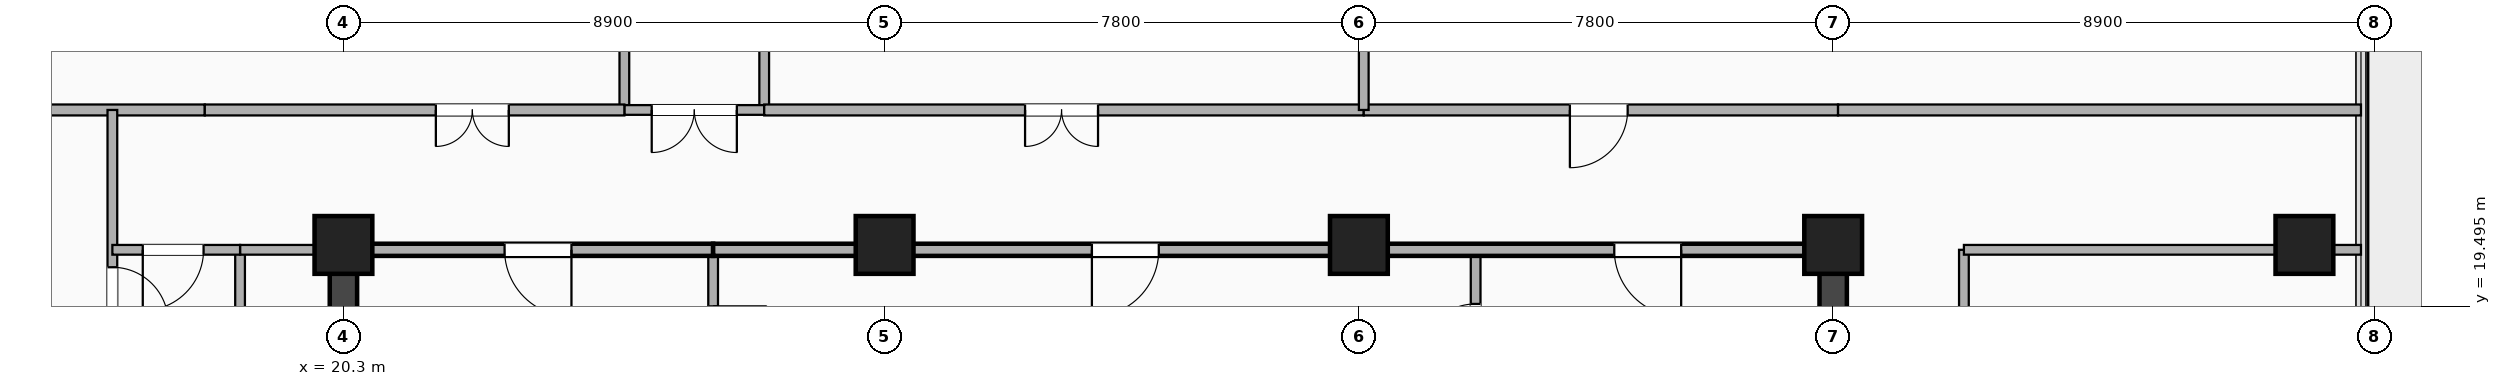
"""IFC4 building model, lengths in metres.
Left out: names, types, materials, properties, quantities, classifications, styles, units other than length and angle.
Written with IfcOpenShell. Run it as: python <this file> out.ifc"""

import sys

from ifc_helpers import new_model, si_unit, direction, frame, frame_2d, origin, origin_2d, place, context, subcontext, project, spatial, rectangle, extrude, element, fill, save


model = new_model("IFC4")
c1 = context("Model", 3, precision=1e-05, world=origin(), true_north=direction((0.0, 1.0)))
c2 = subcontext(c1, "Body", "Model", "MODEL_VIEW")
j1 = project(units=[si_unit("LENGTHUNIT", "METRE"), si_unit("PLANEANGLEUNIT", "RADIAN")], contexts=[c1])
p1 = place(None, origin())
s1 = spatial("IfcSite", under=j1, at=p1, CompositionType="ELEMENT")
p2 = place(p1, origin())
s2 = spatial("IfcBuilding", under=s1, at=p2, CompositionType="ELEMENT")
p3 = place(p2, frame((0.0, 0.0, 192.5)))
s3 = spatial("IfcBuildingStorey", under=s2, at=p3, CompositionType="ELEMENT", Elevation=192.5)
for number, where, z_axis, x_axis in (
    (1, (20.3, 3.5, 0.0), (0.0, 0.0, 1.0), (0.0, 1.0, 0.0)),
    (2, (44.8, 3.5, 0.0), (0.0, 0.0, 1.0), (0.0, 1.0, 0.0)),
):
    element("IfcWall", number, at=place(p3, frame(where, z_axis=z_axis, x_axis=x_axis)), inside=s3, PredefinedType="SHEAR", context=c2, shape_type="SweptSolid", body=[
        extrude(rectangle(XDim=16.9, YDim=0.45, at=frame_2d((8.45, 0.0))), origin(), (0.0, 0.0, 1.0), 4.16),
    ])
for number, where, z_axis, x_axis in (
    (3, (20.3, 20.5, -0.24), (0.0, 0.0, 1.0), (1.0, 0.0, 0.0)),
    (4, (29.2, 20.5, -0.24), (0.0, 0.0, 1.0), (1.0, 0.0, 0.0)),
    (5, (37.0, 20.5, -0.24), (0.0, 0.0, 1.0), (1.0, 0.0, 0.0)),
    (6, (44.8, 20.5, -0.24), (0.0, 0.0, 1.0), (1.0, 0.0, 0.0)),
    (7, (52.55, 20.5, -0.24), (0.0, 0.0, 1.0), (1.0, 0.0, 0.0)),
):
    element("IfcColumn", number, at=place(p3, frame(where, z_axis=z_axis, x_axis=x_axis)), inside=s3, PredefinedType="COLUMN", context=c2, shape_type="SweptSolid", body=[
        extrude(rectangle(XDim=0.95, YDim=0.95, at=origin_2d()), origin(), (0.0, 0.0, 1.0), 4.4),
    ])
p4 = place(p3, frame((26.38, 17.76, 0.0), z_axis=(0.0, 0.0, 1.0), x_axis=(0.0, 1.0, 0.0)))
e8 = element("IfcWall", 8, at=p4, inside=s3, PredefinedType="PARTITIONING", context=c2, shape_type="SweptSolid", body=[
    extrude(rectangle(XDim=2.66, YDim=0.16, at=frame_2d((1.33, 0.0))), origin(), (0.0, 0.0, 1.0), 3.606),
])
p5 = place(p4, frame((0.85, 0.0, 0.0)))
e9 = element("IfcOpeningElement", 9, at=p5, cuts=e8, PredefinedType="OPENING", context=c2, shape_type="SweptSolid", body=[
    extrude(rectangle(XDim=0.88, YDim=2.08, at=frame_2d((0.44, 1.04))), frame((0.0, 0.09, 0.0), z_axis=(0.0, -1.0, 0.0), x_axis=(1.0, 0.0, 0.0)), (0.0, 0.0, 1.0), 0.18),
])
p6 = place(p3, frame((38.92, 17.76, 0.0), z_axis=(0.0, 0.0, 1.0), x_axis=(0.0, 1.0, 0.0)))
e10 = element("IfcWall", 10, at=p6, inside=s3, PredefinedType="PARTITIONING", context=c2, shape_type="SweptSolid", body=[
    extrude(rectangle(XDim=2.66, YDim=0.16, at=frame_2d((1.33, 0.0))), origin(), (0.0, 0.0, 1.0), 3.606),
])
p7 = place(p6, frame((1.77, 0.0, 0.0), z_axis=(0.0, 0.0, 1.0), x_axis=(-1.0, 0.0, 0.0)))
e11 = element("IfcOpeningElement", 11, at=p7, cuts=e10, PredefinedType="OPENING", context=c2, shape_type="SweptSolid", body=[
    extrude(rectangle(XDim=0.92, YDim=2.08, at=frame_2d((0.46, 1.04))), frame((0.0, 0.09, 0.0), z_axis=(0.0, -1.0, 0.0), x_axis=(1.0, 0.0, 0.0)), (0.0, 0.0, 1.0), 0.18),
])
p8 = place(p3, frame((20.65, 20.42, 0.0), z_axis=(0.0, 0.0, 1.0), x_axis=(1.0, 0.0, 0.0)))
e12 = element("IfcWall", 12, at=p8, inside=s3, PredefinedType="PARTITIONING", context=c2, shape_type="SweptSolid", body=[
    extrude(rectangle(XDim=5.73, YDim=0.2, at=frame_2d((2.865, 0.0))), origin(), (0.0, 0.0, 1.0), 3.372),
])
p9 = place(p8, frame((2.3, 0.0, 0.0)))
e13 = element("IfcOpeningElement", 13, at=p9, cuts=e12, PredefinedType="OPENING", context=c2, shape_type="SweptSolid", body=[
    extrude(rectangle(XDim=1.1, YDim=2.15, at=frame_2d((0.55, 1.075))), frame((0.0, 0.11, 0.0), z_axis=(0.0, -1.0, 0.0), x_axis=(1.0, 0.0, 0.0)), (0.0, 0.0, 1.0), 0.22),
])
p10 = place(p3, frame((26.38, 20.42, 0.0), z_axis=(0.0, 0.0, 1.0), x_axis=(1.0, 0.0, 0.0)))
e14 = element("IfcWall", 14, at=p10, inside=s3, PredefinedType="PARTITIONING", context=c2, shape_type="SweptSolid", body=[
    extrude(rectangle(XDim=2.82, YDim=0.2, at=frame_2d((1.41, 0.0))), origin(), (0.0, 0.0, 1.0), 3.372),
])
p11 = place(p3, frame((29.2, 20.42, 0.0), z_axis=(0.0, 0.0, 1.0), x_axis=(1.0, 0.0, 0.0)))
e15 = element("IfcWall", 15, at=p11, inside=s3, PredefinedType="PARTITIONING", context=c2, shape_type="SweptSolid", body=[
    extrude(rectangle(XDim=7.8, YDim=0.2, at=frame_2d((3.9, 0.0))), origin(), (0.0, 0.0, 1.0), 3.372),
])
p12 = place(p11, frame((3.409, 0.0, 0.0)))
e16 = element("IfcOpeningElement", 16, at=p12, cuts=e15, PredefinedType="OPENING", context=c2, shape_type="SweptSolid", body=[
    extrude(rectangle(XDim=1.1, YDim=2.15, at=frame_2d((0.55, 1.075))), frame((0.0, 0.11, 0.0), z_axis=(0.0, -1.0, 0.0), x_axis=(1.0, 0.0, 0.0)), (0.0, 0.0, 1.0), 0.22),
])
p13 = place(p3, frame((37.0, 20.42, 0.0), z_axis=(0.0, 0.0, 1.0), x_axis=(1.0, 0.0, 0.0)))
e17 = element("IfcWall", 17, at=p13, inside=s3, PredefinedType="PARTITIONING", context=c2, shape_type="SweptSolid", body=[
    extrude(rectangle(XDim=7.45, YDim=0.2, at=frame_2d((3.725, 0.0))), origin(), (0.0, 0.0, 1.0), 3.372),
])
p14 = place(p13, frame((4.2, 0.0, 0.0)))
e18 = element("IfcOpeningElement", 18, at=p14, cuts=e17, PredefinedType="OPENING", context=c2, shape_type="SweptSolid", body=[
    extrude(rectangle(XDim=1.1, YDim=2.15, at=frame_2d((0.55, 1.075))), frame((0.0, 0.11, 0.0), z_axis=(0.0, -1.0, 0.0), x_axis=(1.0, 0.0, 0.0)), (0.0, 0.0, 1.0), 0.22),
])
p15 = place(p3, frame((11.47, 22.72, 0.0), z_axis=(0.0, 0.0, 1.0), x_axis=(1.0, 0.0, 0.0)))
e19 = element("IfcWall", 19, at=p15, inside=s3, PredefinedType="PARTITIONING", context=c2, shape_type="SweptSolid", body=[
    extrude(rectangle(XDim=6.55, YDim=0.18, at=frame_2d((3.275, 0.0))), origin(), (0.0, 0.0, 1.0), 3.682),
])
p16 = place(p3, frame((16.5, 18.52, 0.0), z_axis=(0.0, 0.0, 1.0), x_axis=(0.0, 1.0, 0.0)))
e20 = element("IfcWall", 20, at=p16, inside=s3, PredefinedType="PARTITIONING", context=c2, shape_type="SweptSolid", body=[
    extrude(rectangle(XDim=4.2, YDim=0.16, at=frame_2d((2.1, 0.0))), origin(), (0.0, 0.0, 1.0), 3.372),
])
p17 = place(p16, frame((0.693, 0.0, 0.0)))
e21 = element("IfcOpeningElement", 21, at=p17, cuts=e20, PredefinedType="OPENING", context=c2, shape_type="SweptSolid", body=[
    extrude(rectangle(XDim=0.92, YDim=2.08, at=frame_2d((0.46, 1.04))), frame((0.0, 0.09, 0.0), z_axis=(0.0, -1.0, 0.0), x_axis=(1.0, 0.0, 0.0)), (0.0, 0.0, 1.0), 0.18),
])
p18 = place(p3, frame((18.6, 10.55, 0.0), z_axis=(0.0, 0.0, 1.0), x_axis=(0.0, 1.0, 0.0)))
e22 = element("IfcWall", 22, at=p18, inside=s3, PredefinedType="PARTITIONING", context=c2, shape_type="SweptSolid", body=[
    extrude(rectangle(XDim=9.87, YDim=0.16, at=frame_2d((4.935, 0.0))), origin(), (0.0, 0.0, 1.0), 3.372),
])
p19 = place(p18, frame((5.08, 0.0, 0.0), z_axis=(0.0, 0.0, 1.0), x_axis=(-1.0, 0.0, 0.0)))
e23 = element("IfcOpeningElement", 23, at=p19, cuts=e22, PredefinedType="OPENING", context=c2, shape_type="SweptSolid", body=[
    extrude(rectangle(XDim=0.88, YDim=2.08, at=frame_2d((0.44, 1.04))), frame((0.0, 0.09, 0.0), z_axis=(0.0, -1.0, 0.0), x_axis=(1.0, 0.0, 0.0)), (0.0, 0.0, 1.0), 0.18),
])
p20 = place(p3, frame((18.6, 20.42, 0.0), z_axis=(0.0, 0.0, 1.0), x_axis=(1.0, 0.0, 0.0)))
e24 = element("IfcWall", 24, at=p20, inside=s3, PredefinedType="PARTITIONING", context=c2, shape_type="SweptSolid", body=[
    extrude(rectangle(XDim=1.7, YDim=0.16, at=frame_2d((0.85, 0.0))), origin(), (0.0, 0.0, 1.0), 3.372),
])
p21 = place(p3, frame((16.5, 20.42, 0.0), z_axis=(0.0, 0.0, 1.0), x_axis=(1.0, 0.0, 0.0)))
e25 = element("IfcWall", 25, at=p21, inside=s3, PredefinedType="PARTITIONING", context=c2, shape_type="SweptSolid", body=[
    extrude(rectangle(XDim=2.1, YDim=0.16, at=frame_2d((1.05, 0.0))), origin(), (0.0, 0.0, 1.0), 3.372),
])
p22 = place(p21, frame((0.5, 0.0, 0.0)))
e26 = element("IfcOpeningElement", 26, at=p22, cuts=e25, PredefinedType="OPENING", context=c2, shape_type="SweptSolid", body=[
    extrude(rectangle(XDim=1.0, YDim=2.15, at=frame_2d((0.5, 1.075))), frame((0.0, 0.09, 0.0), z_axis=(0.0, -1.0, 0.0), x_axis=(1.0, 0.0, 0.0)), (0.0, 0.0, 1.0), 0.18),
])
p23 = place(p3, frame((46.95, 16.88, 0.0), z_axis=(0.0, 0.0, 1.0), x_axis=(0.0, 1.0, 0.0)))
e27 = element("IfcWall", 27, at=p23, inside=s3, PredefinedType="PARTITIONING", context=c2, shape_type="SweptSolid", body=[
    extrude(rectangle(XDim=3.54, YDim=0.16, at=frame_2d((1.77, 0.0))), origin(), (0.0, 0.0, 1.0), 3.372),
])
p24 = place(p23, frame((2.03, 0.0, 0.0), z_axis=(0.0, 0.0, 1.0), x_axis=(-1.0, 0.0, 0.0)))
e28 = element("IfcOpeningElement", 28, at=p24, cuts=e27, PredefinedType="OPENING", context=c2, shape_type="SweptSolid", body=[
    extrude(rectangle(XDim=0.88, YDim=2.08, at=frame_2d((0.44, 1.04))), frame((0.0, 0.09, 0.0), z_axis=(0.0, -1.0, 0.0), x_axis=(1.0, 0.0, 0.0)), (0.0, 0.0, 1.0), 0.18),
])
p25 = place(p3, frame((46.95, 20.42, 0.0), z_axis=(0.0, 0.0, 1.0), x_axis=(1.0, 0.0, 0.0)))
e29 = element("IfcWall", 29, at=p25, inside=s3, PredefinedType="PARTITIONING", context=c2, shape_type="SweptSolid", body=[
    extrude(rectangle(XDim=6.53, YDim=0.16, at=frame_2d((3.265, 0.0))), origin(), (0.0, 0.0, 1.0), 3.372),
])
for number, where, z_axis, x_axis in (
    (30, (24.92, 22.72, 0.0), (0.0, 0.0, 1.0), (0.0, 1.0, 0.0)),
    (31, (27.22, 22.72, 0.0), (0.0, 0.0, 1.0), (0.0, 1.0, 0.0)),
):
    element("IfcWall", number, at=place(p3, frame(where, z_axis=z_axis, x_axis=x_axis)), inside=s3, PredefinedType="PARTITIONING", context=c2, shape_type="SweptSolid", body=[
        extrude(rectangle(XDim=8.4, YDim=0.16, at=frame_2d((4.2, 0.0))), origin(), (0.0, 0.0, 1.0), 3.787),
    ])
p26 = place(p3, frame((24.92, 22.72, 0.0), z_axis=(0.0, 0.0, 1.0), x_axis=(1.0, 0.0, 0.0)))
e32 = element("IfcWall", 32, at=p26, inside=s3, PredefinedType="PARTITIONING", context=c2, shape_type="SweptSolid", body=[
    extrude(rectangle(XDim=2.3, YDim=0.16, at=frame_2d((1.15, 0.0))), origin(), (0.0, 0.0, 1.0), 4.16),
])
p27 = place(p26, frame((0.45, 0.0, 0.0)))
e33 = element("IfcOpeningElement", 33, at=p27, cuts=e32, PredefinedType="OPENING", context=c2, shape_type="SweptSolid", body=[
    extrude(rectangle(XDim=1.4, YDim=2.2, at=frame_2d((0.7, 1.1))), frame((0.0, 0.09, 0.0), z_axis=(0.0, -1.0, 0.0), x_axis=(1.0, 0.0, 0.0)), (0.0, 0.0, 1.0), 0.18),
])
p28 = place(p3, frame((18.02, 22.72, 0.0), z_axis=(0.0, 0.0, 1.0), x_axis=(1.0, 0.0, 0.0)))
e34 = element("IfcWall", 34, at=p28, inside=s3, PredefinedType="PARTITIONING", context=c2, shape_type="SweptSolid", body=[
    extrude(rectangle(XDim=6.9, YDim=0.18, at=frame_2d((3.45, 0.0))), origin(), (0.0, 0.0, 1.0), 3.372),
])
p29 = place(p28, frame((3.8, 0.0, 0.0)))
e35 = element("IfcOpeningElement", 35, at=p29, cuts=e34, PredefinedType="OPENING", context=c2, shape_type="SweptSolid", body=[
    extrude(rectangle(XDim=1.2, YDim=2.14, at=frame_2d((0.6, 1.07))), frame((0.0, 0.1, 0.0), z_axis=(0.0, -1.0, 0.0), x_axis=(1.0, 0.0, 0.0)), (0.0, 0.0, 1.0), 0.2),
])
p30 = place(p3, frame((27.22, 22.72, 0.0), z_axis=(0.0, 0.0, 1.0), x_axis=(1.0, 0.0, 0.0)))
e36 = element("IfcWall", 36, at=p30, inside=s3, PredefinedType="PARTITIONING", context=c2, shape_type="SweptSolid", body=[
    extrude(rectangle(XDim=9.86, YDim=0.18, at=frame_2d((4.93, 0.0))), origin(), (0.0, 0.0, 1.0), 3.372),
])
p31 = place(p30, frame((4.29, 0.0, 0.0)))
e37 = element("IfcOpeningElement", 37, at=p31, cuts=e36, PredefinedType="OPENING", context=c2, shape_type="SweptSolid", body=[
    extrude(rectangle(XDim=1.2, YDim=2.14, at=frame_2d((0.6, 1.07))), frame((0.0, 0.1, 0.0), z_axis=(0.0, -1.0, 0.0), x_axis=(1.0, 0.0, 0.0)), (0.0, 0.0, 1.0), 0.2),
])
p32 = place(p3, frame((37.08, 22.72, 0.0), z_axis=(0.0, 0.0, 1.0), x_axis=(1.0, 0.0, 0.0)))
e38 = element("IfcWall", 38, at=p32, inside=s3, PredefinedType="PARTITIONING", context=c2, shape_type="SweptSolid", body=[
    extrude(rectangle(XDim=7.8, YDim=0.18, at=frame_2d((3.9, 0.0))), origin(), (0.0, 0.0, 1.0), 3.372),
])
p33 = place(p32, frame((3.39, 0.0, 0.0)))
e39 = element("IfcOpeningElement", 39, at=p33, cuts=e38, PredefinedType="OPENING", context=c2, shape_type="SweptSolid", body=[
    extrude(rectangle(XDim=0.95, YDim=2.15, at=frame_2d((0.475, 1.075))), frame((0.0, 0.1, 0.0), z_axis=(0.0, -1.0, 0.0), x_axis=(1.0, 0.0, 0.0)), (0.0, 0.0, 1.0), 0.2),
])
p34 = place(p3, frame((44.88, 22.72, 0.0), z_axis=(0.0, 0.0, 1.0), x_axis=(1.0, 0.0, 0.0)))
e40 = element("IfcWall", 40, at=p34, inside=s3, PredefinedType="PARTITIONING", context=c2, shape_type="SweptSolid", body=[
    extrude(rectangle(XDim=8.6, YDim=0.18, at=frame_2d((4.3, 0.0))), origin(), (0.0, 0.0, 1.0), 3.372),
])
p35 = place(p3, frame((37.08, 22.72, 0.0), z_axis=(0.0, 0.0, 1.0), x_axis=(0.0, 1.0, 0.0)))
e41 = element("IfcWall", 41, at=p35, inside=s3, PredefinedType="PARTITIONING", context=c2, shape_type="SweptSolid", body=[
    extrude(rectangle(XDim=8.4, YDim=0.16, at=frame_2d((4.2, 0.0))), origin(), (0.0, 0.0, 1.0), 3.372),
])
p36 = place(p7, origin())
e42 = element("IfcDoor", 42, at=p36, inside=s3, OperationType="SINGLE_SWING_LEFT", PredefinedType="DOOR", context=c2, shape_type="SweptSolid", body=[
    extrude(rectangle(XDim=0.92, YDim=2.08, at=frame_2d((0.46, 1.04))), frame((0.0, 0.025, 0.0), z_axis=(0.0, -1.0, 0.0), x_axis=(1.0, 0.0, 0.0)), (0.0, 0.0, 1.0), 0.05),
])
fill(e11, e42)
p37 = place(p9, origin())
e43 = element("IfcDoor", 43, at=p37, inside=s3, OperationType="SINGLE_SWING_RIGHT", PredefinedType="DOOR", context=c2, shape_type="SweptSolid", body=[
    extrude(rectangle(XDim=1.1, YDim=2.15, at=frame_2d((0.55, 1.075))), frame((0.0, 0.025, 0.0), z_axis=(0.0, -1.0, 0.0), x_axis=(1.0, 0.0, 0.0)), (0.0, 0.0, 1.0), 0.05),
])
fill(e13, e43)
p38 = place(p12, origin())
e44 = element("IfcDoor", 44, at=p38, inside=s3, OperationType="SINGLE_SWING_LEFT", PredefinedType="DOOR", context=c2, shape_type="SweptSolid", body=[
    extrude(rectangle(XDim=1.1, YDim=2.15, at=frame_2d((0.55, 1.075))), frame((0.0, 0.025, 0.0), z_axis=(0.0, -1.0, 0.0), x_axis=(1.0, 0.0, 0.0)), (0.0, 0.0, 1.0), 0.05),
])
fill(e16, e44)
p39 = place(p14, origin())
e45 = element("IfcDoor", 45, at=p39, inside=s3, OperationType="SINGLE_SWING_RIGHT", PredefinedType="DOOR", context=c2, shape_type="SweptSolid", body=[
    extrude(rectangle(XDim=1.1, YDim=2.15, at=frame_2d((0.55, 1.075))), frame((0.0, 0.025, 0.0), z_axis=(0.0, -1.0, 0.0), x_axis=(1.0, 0.0, 0.0)), (0.0, 0.0, 1.0), 0.05),
])
fill(e18, e45)
p40 = place(p17, origin())
e46 = element("IfcDoor", 46, at=p40, inside=s3, OperationType="SINGLE_SWING_LEFT", PredefinedType="DOOR", context=c2, shape_type="SweptSolid", body=[
    extrude(rectangle(XDim=0.92, YDim=2.08, at=frame_2d((0.46, 1.04))), frame((0.0, 0.025, 0.0), z_axis=(0.0, -1.0, 0.0), x_axis=(1.0, 0.0, 0.0)), (0.0, 0.0, 1.0), 0.05),
])
fill(e21, e46)
p41 = place(p22, origin())
e47 = element("IfcDoor", 47, at=p41, inside=s3, OperationType="SINGLE_SWING_LEFT", PredefinedType="DOOR", context=c2, shape_type="SweptSolid", body=[
    extrude(rectangle(XDim=1.0, YDim=2.15, at=frame_2d((0.5, 1.075))), frame((0.0, 0.025, 0.0), z_axis=(0.0, -1.0, 0.0), x_axis=(1.0, 0.0, 0.0)), (0.0, 0.0, 1.0), 0.05),
])
fill(e26, e47)
p42 = place(p27, origin())
e48 = element("IfcDoor", 48, at=p42, inside=s3, OperationType="DOUBLE_DOOR_SINGLE_SWING", PredefinedType="DOOR", context=c2, shape_type="SweptSolid", body=[
    extrude(rectangle(XDim=1.4, YDim=2.2, at=frame_2d((0.7, 1.1))), frame((0.0, 0.025, 0.0), z_axis=(0.0, -1.0, 0.0), x_axis=(1.0, 0.0, 0.0)), (0.0, 0.0, 1.0), 0.05),
])
fill(e33, e48)
p43 = place(p29, origin())
e49 = element("IfcDoor", 49, at=p43, inside=s3, OperationType="DOUBLE_DOOR_SINGLE_SWING", PredefinedType="DOOR", context=c2, shape_type="SweptSolid", body=[
    extrude(rectangle(XDim=1.2, YDim=2.14, at=frame_2d((0.6, 1.07))), frame((0.0, 0.025, 0.0), z_axis=(0.0, -1.0, 0.0), x_axis=(1.0, 0.0, 0.0)), (0.0, 0.0, 1.0), 0.05),
])
fill(e35, e49)
p44 = place(p31, origin())
e50 = element("IfcDoor", 50, at=p44, inside=s3, OperationType="DOUBLE_DOOR_SINGLE_SWING", PredefinedType="DOOR", context=c2, shape_type="SweptSolid", body=[
    extrude(rectangle(XDim=1.2, YDim=2.14, at=frame_2d((0.6, 1.07))), frame((0.0, 0.025, 0.0), z_axis=(0.0, -1.0, 0.0), x_axis=(1.0, 0.0, 0.0)), (0.0, 0.0, 1.0), 0.05),
])
fill(e37, e50)
p45 = place(p33, origin())
e51 = element("IfcDoor", 51, at=p45, inside=s3, OperationType="SINGLE_SWING_LEFT", PredefinedType="DOOR", context=c2, shape_type="SweptSolid", body=[
    extrude(rectangle(XDim=0.95, YDim=2.15, at=frame_2d((0.475, 1.075))), frame((0.0, 0.025, 0.0), z_axis=(0.0, -1.0, 0.0), x_axis=(1.0, 0.0, 0.0)), (0.0, 0.0, 1.0), 0.05),
])
fill(e39, e51)
save(model, sys.argv[1])
